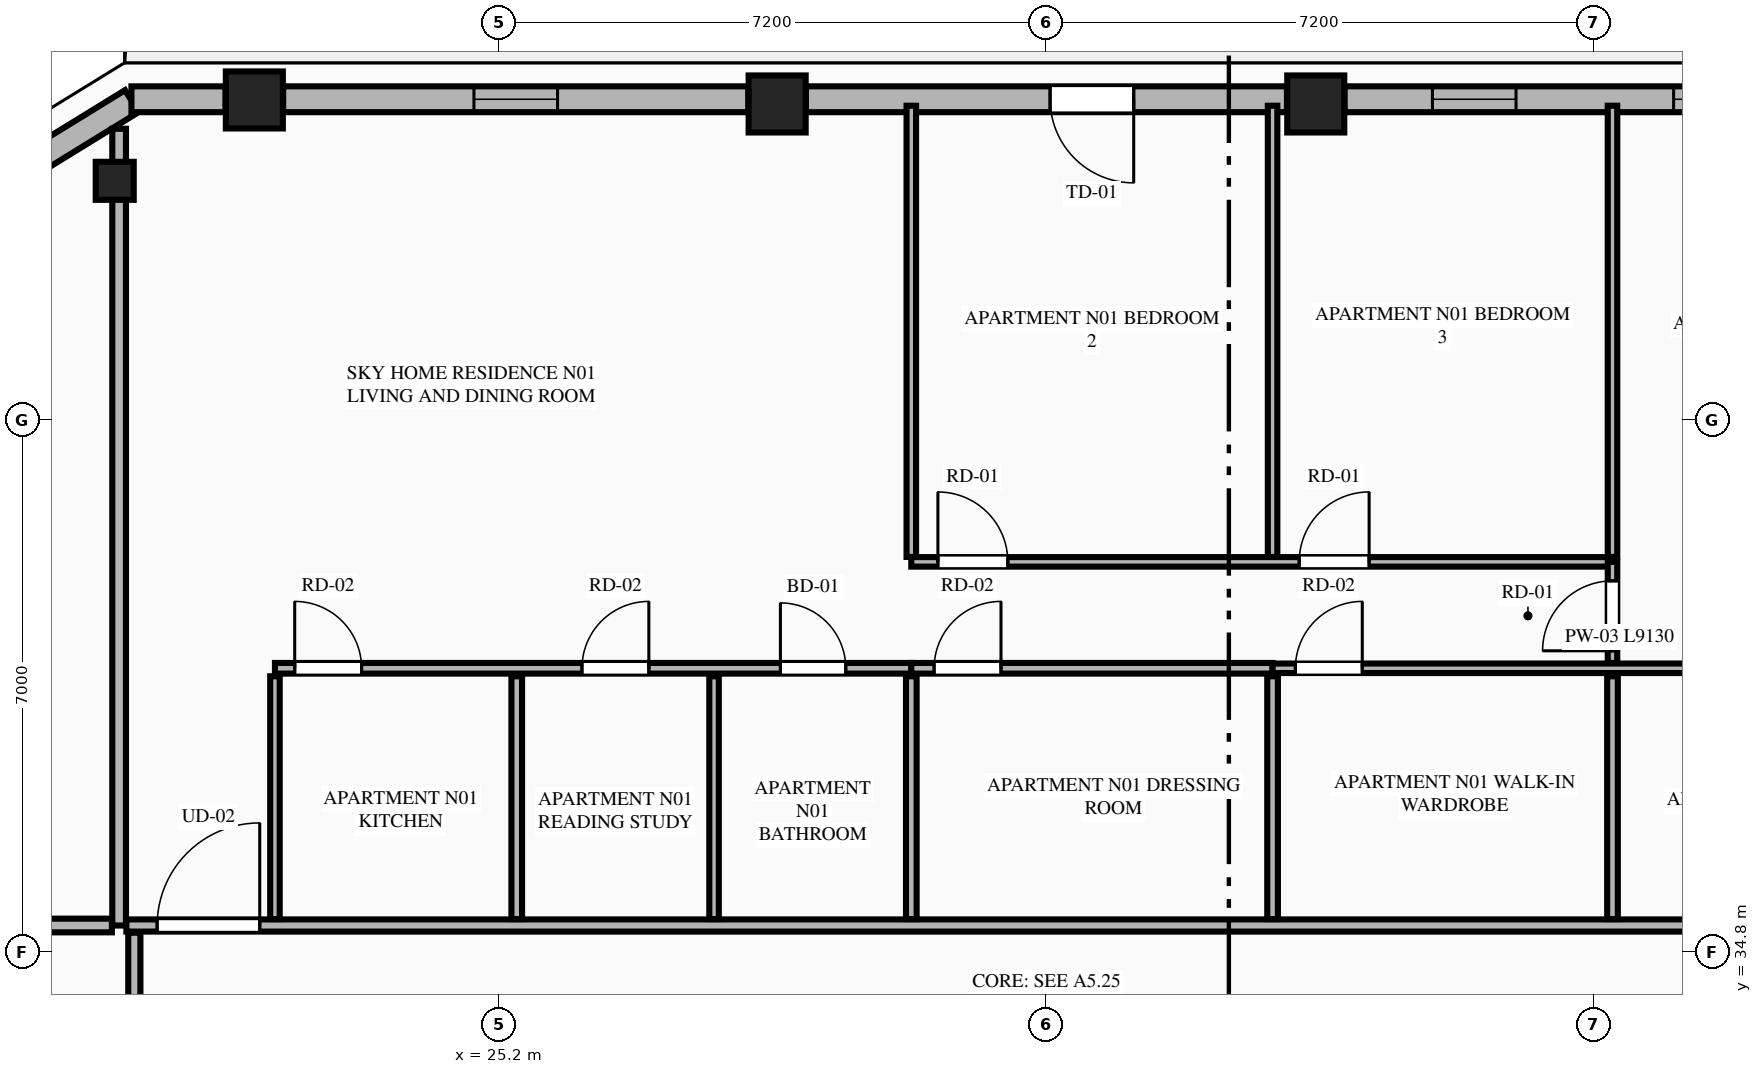
"""IFC4 building model, lengths in metres.
Left out: names, types, materials, properties, quantities, classifications, styles, units other than length and angle.
Written with IfcOpenShell. Run it as: python <this file> out.ifc"""

import sys

from ifc_helpers import new_model, si_unit, direction, frame, frame_2d, origin, origin_2d, place, context, subcontext, project, spatial, rectangle, extrude, element, fill, save


model = new_model("IFC4")
c1 = context("Model", 3, precision=1e-05, world=origin(), true_north=direction((0.0, 1.0)))
c2 = subcontext(c1, "Body", "Model", "MODEL_VIEW")
j1 = project(units=[si_unit("LENGTHUNIT", "METRE"), si_unit("PLANEANGLEUNIT", "RADIAN")], contexts=[c1])
p1 = place(None, origin())
s1 = spatial("IfcSite", under=j1, at=p1, CompositionType="ELEMENT")
p2 = place(p1, origin())
s2 = spatial("IfcBuilding", under=s1, at=p2, CompositionType="ELEMENT")
p3 = place(p2, frame((0.0, 0.0, 218.05)))
s3 = spatial("IfcBuildingStorey", under=s2, at=p3, CompositionType="ELEMENT", Elevation=218.05)
for number, where, z_axis, x_axis in (
    (1, (35.943, 45.958, 0.0), (0.0, 0.0, 1.0), (1.0, 0.0, 0.0)),
    (2, (28.857, 45.958, 0.0), (0.0, 0.0, 1.0), (1.0, 0.0, 0.0)),
    (3, (21.979, 46.011, 0.0), (0.0, 0.0, 1.0), (1.0, 0.0, 0.0)),
):
    element("IfcColumn", number, at=place(p3, frame(where, z_axis=z_axis, x_axis=x_axis)), inside=s3, PredefinedType="COLUMN", context=c2, shape_type="SweptSolid", body=[
        extrude(rectangle(XDim=0.75, YDim=0.75, at=origin_2d()), origin(), (0.0, 0.0, 1.0), 3.55),
    ])
p4 = place(p3, frame((20.142, 44.947, 0.0), z_axis=(0.0, 0.0, 1.0), x_axis=(-0.865230187018, -0.501374833306, 0.0)))
e4 = element("IfcColumn", 4, at=p4, inside=s3, PredefinedType="PILASTER", context=c2, shape_type="SweptSolid", body=[
    extrude(rectangle(XDim=0.5, YDim=0.35, at=origin_2d()), origin(), (0.0, 0.0, 1.0), 3.55),
])
p5 = place(p3, frame((20.367, 45.995, 0.0), z_axis=(0.0, 0.0, 1.0), x_axis=(-0.851713271379, -0.524008113828, 0.0)))
e5 = element("IfcWall", 5, at=p5, inside=s3, PredefinedType="STANDARD", context=c2, shape_type="SweptSolid", body=[
    extrude(rectangle(XDim=1.678, YDim=0.34, at=frame_2d((0.839, 0.0))), origin(), (0.0, 0.0, 1.0), 3.27),
])
p6 = place(p3, frame((42.442, 46.02, 0.0), z_axis=(0.0, 0.0, 1.0), x_axis=(-1.0, 0.0, 0.0)))
e6 = element("IfcWall", 6, at=p6, inside=s3, PredefinedType="STANDARD", context=c2, shape_type="SweptSolid", body=[
    extrude(rectangle(XDim=6.12, YDim=0.34, at=frame_2d((3.06, 0.0))), origin(), (0.0, 0.0, 1.0), 2.803),
])
p7 = place(p6, frame((0.691, 0.0, 0.75)))
e7 = element("IfcOpeningElement", 7, at=p7, cuts=e6, PredefinedType="OPENING", context=c2, shape_type="SweptSolid", body=[
    extrude(rectangle(XDim=1.1, YDim=1.903, at=frame_2d((0.55, 0.952))), frame((0.0, 0.18, 0.0), z_axis=(0.0, -1.0, 0.0), x_axis=(1.0, 0.0, 0.0)), (0.0, 0.0, 1.0), 0.36),
])
p8 = place(p6, frame((3.864, 0.0, 0.75)))
e8 = element("IfcOpeningElement", 8, at=p8, cuts=e6, PredefinedType="OPENING", context=c2, shape_type="SweptSolid", body=[
    extrude(rectangle(XDim=1.1, YDim=1.903, at=frame_2d((0.55, 0.952))), frame((0.0, 0.18, 0.0), z_axis=(0.0, -1.0, 0.0), x_axis=(1.0, 0.0, 0.0)), (0.0, 0.0, 1.0), 0.36),
])
p9 = place(p3, frame((35.564, 46.02, 0.0), z_axis=(0.0, 0.0, 1.0), x_axis=(-1.0, 0.0, 0.0)))
e9 = element("IfcWall", 9, at=p9, inside=s3, PredefinedType="STANDARD", context=c2, shape_type="SweptSolid", body=[
    extrude(rectangle(XDim=6.328, YDim=0.34, at=frame_2d((3.164, 0.0))), origin(), (0.0, 0.0, 1.0), 2.803),
])
p10 = place(p9, frame((2.016, 0.0, 0.0)))
e10 = element("IfcOpeningElement", 10, at=p10, cuts=e9, PredefinedType="OPENING", context=c2, shape_type="SweptSolid", body=[
    extrude(rectangle(XDim=1.1, YDim=2.25, at=frame_2d((0.55, 1.125))), frame((0.0, 0.18, 0.0), z_axis=(0.0, -1.0, 0.0), x_axis=(1.0, 0.0, 0.0)), (0.0, 0.0, 1.0), 0.36),
])
p11 = place(p3, frame((28.478, 46.02, 0.0), z_axis=(0.0, 0.0, 1.0), x_axis=(-1.0, 0.0, 0.0)))
e11 = element("IfcWall", 11, at=p11, inside=s3, PredefinedType="STANDARD", context=c2, shape_type="SweptSolid", body=[
    extrude(rectangle(XDim=6.12, YDim=0.34, at=frame_2d((3.06, 0.0))), origin(), (0.0, 0.0, 1.0), 2.803),
])
p12 = place(p11, frame((2.51, 0.0, 0.75)))
e12 = element("IfcOpeningElement", 12, at=p12, cuts=e11, PredefinedType="OPENING", context=c2, shape_type="SweptSolid", body=[
    extrude(rectangle(XDim=1.1, YDim=1.903, at=frame_2d((0.55, 0.952))), frame((0.0, 0.18, 0.0), z_axis=(0.0, -1.0, 0.0), x_axis=(1.0, 0.0, 0.0)), (0.0, 0.0, 1.0), 0.36),
])
p13 = place(p3, frame((21.6, 46.02, 0.0), z_axis=(0.0, 0.0, 1.0), x_axis=(-1.0, 0.0, 0.0)))
e13 = element("IfcWall", 13, at=p13, inside=s3, PredefinedType="STANDARD", context=c2, shape_type="SweptSolid", body=[
    extrude(rectangle(XDim=1.238, YDim=0.34, at=frame_2d((0.619, 0.0))), origin(), (0.0, 0.0, 1.0), 3.27),
])
p14 = place(p3, frame((20.2, 35.15, 0.0), z_axis=(0.0, 0.0, 1.0), x_axis=(0.0, 1.0, 0.0)))
e14 = element("IfcWall", 14, at=p14, inside=s3, PredefinedType="PARTITIONING", context=c2, shape_type="SweptSolid", body=[
    extrude(rectangle(XDim=10.482, YDim=0.18, at=frame_2d((5.241, 0.0))), origin(), (0.0, 0.0, 1.0), 3.27),
])
p15 = place(p3, frame((20.295, 35.15, 0.0), z_axis=(0.0, 0.0, 1.0), x_axis=(1.0, 0.0, 0.0)))
e15 = element("IfcWall", 15, at=p15, inside=s3, PredefinedType="PARTITIONING", context=c2, shape_type="SweptSolid", body=[
    extrude(rectangle(XDim=24.21, YDim=0.16, at=frame_2d((12.105, 0.0))), origin(), (0.0, 0.0, 1.0), 3.27),
])
p16 = place(p15, frame((0.405, 0.0, 0.0)))
e16 = element("IfcOpeningElement", 16, at=p16, cuts=e15, PredefinedType="OPENING", context=c2, shape_type="SweptSolid", body=[
    extrude(rectangle(XDim=1.35, YDim=2.35, at=frame_2d((0.675, 1.175))), frame((0.0, 0.09, 0.0), z_axis=(0.0, -1.0, 0.0), x_axis=(1.0, 0.0, 0.0)), (0.0, 0.0, 1.0), 0.18),
])
p17 = place(p3, frame((22.25, 35.235, 0.0), z_axis=(0.0, 0.0, 1.0), x_axis=(0.0, 1.0, 0.0)))
e17 = element("IfcWall", 17, at=p17, inside=s3, PredefinedType="PARTITIONING", context=c2, shape_type="SweptSolid", body=[
    extrude(rectangle(XDim=3.194, YDim=0.125, at=frame_2d((1.597, 0.0))), origin(), (0.0, 0.0, 1.0), 2.727),
])
p18 = place(p3, frame((22.25, 38.534, 0.0), z_axis=(0.0, 0.0, 1.0), x_axis=(1.0, 0.0, 0.0)))
e18 = element("IfcWall", 18, at=p18, inside=s3, PredefinedType="PLUMBINGWALL", context=c2, shape_type="SweptSolid", body=[
    extrude(rectangle(XDim=8.372, YDim=0.14, at=frame_2d((4.186, 0.0))), origin(), (0.0, 0.0, 1.0), 3.27),
])
p19 = place(p18, frame((6.65, 0.0, 0.0)))
e19 = element("IfcOpeningElement", 19, at=p19, cuts=e18, PredefinedType="OPENING", context=c2, shape_type="SweptSolid", body=[
    extrude(rectangle(XDim=0.86, YDim=2.1, at=frame_2d((0.43, 1.05))), frame((0.0, 0.08, 0.0), z_axis=(0.0, -1.0, 0.0), x_axis=(1.0, 0.0, 0.0)), (0.0, 0.0, 1.0), 0.16),
])
p20 = place(p18, frame((0.26, 0.0, 0.0)))
e20 = element("IfcOpeningElement", 20, at=p20, cuts=e18, PredefinedType="OPENING", context=c2, shape_type="SweptSolid", body=[
    extrude(rectangle(XDim=0.88, YDim=2.15, at=frame_2d((0.44, 1.075))), frame((0.0, 0.08, 0.0), z_axis=(0.0, -1.0, 0.0), x_axis=(1.0, 0.0, 0.0)), (0.0, 0.0, 1.0), 0.16),
])
p21 = place(p18, frame((4.039, 0.0, 0.0)))
e21 = element("IfcOpeningElement", 21, at=p21, cuts=e18, PredefinedType="OPENING", context=c2, shape_type="SweptSolid", body=[
    extrude(rectangle(XDim=0.88, YDim=2.15, at=frame_2d((0.44, 1.075))), frame((0.0, 0.08, 0.0), z_axis=(0.0, -1.0, 0.0), x_axis=(1.0, 0.0, 0.0)), (0.0, 0.0, 1.0), 0.16),
])
p22 = place(p3, frame((30.622, 38.534, 0.0), z_axis=(0.0, 0.0, 1.0), x_axis=(1.0, 0.0, 0.0)))
e22 = element("IfcWall", 22, at=p22, inside=s3, PredefinedType="PLUMBINGWALL", context=c2, shape_type="SweptSolid", body=[
    extrude(rectangle(XDim=4.753, YDim=0.14, at=frame_2d((2.376, 0.0))), origin(), (0.0, 0.0, 1.0), 3.27),
])
p23 = place(p22, frame((0.3, 0.0, 0.0)))
e23 = element("IfcOpeningElement", 23, at=p23, cuts=e22, PredefinedType="OPENING", context=c2, shape_type="SweptSolid", body=[
    extrude(rectangle(XDim=0.88, YDim=2.15, at=frame_2d((0.44, 1.075))), frame((0.0, 0.08, 0.0), z_axis=(0.0, -1.0, 0.0), x_axis=(1.0, 0.0, 0.0)), (0.0, 0.0, 1.0), 0.16),
])
p24 = place(p3, frame((35.375, 38.534, 0.0), z_axis=(0.0, 0.0, 1.0), x_axis=(1.0, 0.0, 0.0)))
e24 = element("IfcWall", 24, at=p24, inside=s3, PredefinedType="PARTITIONING", context=c2, shape_type="SweptSolid", body=[
    extrude(rectangle(XDim=9.13, YDim=0.125, at=frame_2d((4.565, 0.0))), origin(), (0.0, 0.0, 1.0), 3.27),
])
p25 = place(p24, frame((6.376, 0.0, 0.0)))
e25 = element("IfcOpeningElement", 25, at=p25, cuts=e24, PredefinedType="OPENING", context=c2, shape_type="SweptSolid", body=[
    extrude(rectangle(XDim=0.86, YDim=2.1, at=frame_2d((0.43, 1.05))), frame((0.0, 0.073, 0.0), z_axis=(0.0, -1.0, 0.0), x_axis=(1.0, 0.0, 0.0)), (0.0, 0.0, 1.0), 0.145),
])
p26 = place(p24, frame((0.3, 0.0, 0.0)))
e26 = element("IfcOpeningElement", 26, at=p26, cuts=e24, PredefinedType="OPENING", context=c2, shape_type="SweptSolid", body=[
    extrude(rectangle(XDim=0.88, YDim=2.15, at=frame_2d((0.44, 1.075))), frame((0.0, 0.073, 0.0), z_axis=(0.0, -1.0, 0.0), x_axis=(1.0, 0.0, 0.0)), (0.0, 0.0, 1.0), 0.145),
])
p27 = place(p3, frame((25.431, 35.235, 0.0), z_axis=(0.0, 0.0, 1.0), x_axis=(0.0, 1.0, 0.0)))
e27 = element("IfcWall", 27, at=p27, inside=s3, PredefinedType="PLUMBINGWALL", context=c2, shape_type="SweptSolid", body=[
    extrude(rectangle(XDim=3.194, YDim=0.14, at=frame_2d((1.597, 0.0))), origin(), (0.0, 0.0, 1.0), 3.27),
])
p28 = place(p3, frame((28.027, 35.235, 0.0), z_axis=(0.0, 0.0, 1.0), x_axis=(0.0, 1.0, 0.0)))
e28 = element("IfcWall", 28, at=p28, inside=s3, PredefinedType="PARTITIONING", context=c2, shape_type="SweptSolid", body=[
    extrude(rectangle(XDim=3.194, YDim=0.125, at=frame_2d((1.597, 0.0))), origin(), (0.0, 0.0, 1.0), 3.27),
])
p29 = place(p3, frame((30.622, 39.999, 0.0), z_axis=(0.0, 0.0, 1.0), x_axis=(0.0, 1.0, 0.0)))
e29 = element("IfcWall", 29, at=p29, inside=s3, PredefinedType="PARTITIONING", context=c2, shape_type="SweptSolid", body=[
    extrude(rectangle(XDim=5.936, YDim=0.125, at=frame_2d((2.968, 0.0))), origin(), (0.0, 0.0, 1.0), 3.27),
])
p30 = place(p3, frame((30.622, 39.934, 0.0), z_axis=(0.0, 0.0, 1.0), x_axis=(1.0, 0.0, 0.0)))
e30 = element("IfcWall", 30, at=p30, inside=s3, PredefinedType="PARTITIONING", context=c2, shape_type="SweptSolid", body=[
    extrude(rectangle(XDim=9.225, YDim=0.125, at=frame_2d((4.612, 0.0))), origin(), (0.0, 0.0, 1.0), 3.27),
])
p31 = place(p30, frame((0.35, 0.0, 0.0)))
e31 = element("IfcOpeningElement", 31, at=p31, cuts=e30, PredefinedType="OPENING", context=c2, shape_type="SweptSolid", body=[
    extrude(rectangle(XDim=0.92, YDim=2.15, at=frame_2d((0.46, 1.075))), frame((0.0, 0.073, 0.0), z_axis=(0.0, -1.0, 0.0), x_axis=(1.0, 0.0, 0.0)), (0.0, 0.0, 1.0), 0.145),
])
p32 = place(p30, frame((5.103, 0.0, 0.0)))
e32 = element("IfcOpeningElement", 32, at=p32, cuts=e30, PredefinedType="OPENING", context=c2, shape_type="SweptSolid", body=[
    extrude(rectangle(XDim=0.92, YDim=2.15, at=frame_2d((0.46, 1.075))), frame((0.0, 0.073, 0.0), z_axis=(0.0, -1.0, 0.0), x_axis=(1.0, 0.0, 0.0)), (0.0, 0.0, 1.0), 0.145),
])
p33 = place(p3, frame((39.847, 38.604, 0.0), z_axis=(0.0, 0.0, 1.0), x_axis=(0.0, 1.0, 0.0)))
e33 = element("IfcWall", 33, at=p33, inside=s3, PredefinedType="PARTITIONING", context=c2, shape_type="SweptSolid", body=[
    extrude(rectangle(XDim=1.33, YDim=0.125, at=frame_2d((0.665, 0.0))), origin(), (0.0, 0.0, 1.0), 3.27),
])
p34 = place(p33, frame((0.16, 0.0, 0.0)))
e34 = element("IfcOpeningElement", 34, at=p34, cuts=e33, PredefinedType="OPENING", context=c2, shape_type="SweptSolid", body=[
    extrude(rectangle(XDim=0.92, YDim=2.15, at=frame_2d((0.46, 1.075))), frame((0.0, 0.073, 0.0), z_axis=(0.0, -1.0, 0.0), x_axis=(1.0, 0.0, 0.0)), (0.0, 0.0, 1.0), 0.145),
])
for number, where, z_axis, x_axis in (
    (35, (30.622, 35.235, 0.0), (0.0, 0.0, 1.0), (0.0, 1.0, 0.0)),
    (36, (35.375, 35.235, 0.0), (0.0, 0.0, 1.0), (0.0, 1.0, 0.0)),
):
    element("IfcWall", number, at=place(p3, frame(where, z_axis=z_axis, x_axis=x_axis)), inside=s3, PredefinedType="PLUMBINGWALL", context=c2, shape_type="SweptSolid", body=[
        extrude(rectangle(XDim=3.194, YDim=0.14, at=frame_2d((1.597, 0.0))), origin(), (0.0, 0.0, 1.0), 3.27),
    ])
for number, where, z_axis, x_axis in (
    (37, (35.375, 39.999, 0.0), (0.0, 0.0, 1.0), (0.0, 1.0, 0.0)),
    (38, (39.847, 39.999, 0.0), (0.0, 0.0, 1.0), (0.0, 1.0, 0.0)),
):
    element("IfcWall", number, at=place(p3, frame(where, z_axis=z_axis, x_axis=x_axis)), inside=s3, PredefinedType="PARTITIONING", context=c2, shape_type="SweptSolid", body=[
        extrude(rectangle(XDim=5.936, YDim=0.125, at=frame_2d((2.968, 0.0))), origin(), (0.0, 0.0, 1.0), 3.27),
    ])
p35 = place(p3, frame((39.847, 35.235, 0.0), z_axis=(0.0, 0.0, 1.0), x_axis=(0.0, 1.0, 0.0)))
e39 = element("IfcWall", 39, at=p35, inside=s3, PredefinedType="PLUMBINGWALL", context=c2, shape_type="SweptSolid", body=[
    extrude(rectangle(XDim=3.194, YDim=0.14, at=frame_2d((1.597, 0.0))), origin(), (0.0, 0.0, 1.0), 3.27),
])
p36 = place(p3, frame((14.11, 35.15, 0.0), z_axis=(0.0, 0.0, 1.0), x_axis=(1.0, 0.0, 0.0)))
e40 = element("IfcWall", 40, at=p36, inside=s3, PredefinedType="PARTITIONING", context=c2, shape_type="SweptSolid", body=[
    extrude(rectangle(XDim=5.995, YDim=0.18, at=frame_2d((2.998, 0.0))), origin(), (0.0, 0.0, 1.0), 3.27),
])
p37 = place(p3, frame((20.4, 25.417, 0.0), z_axis=(0.0, 0.0, 1.0), x_axis=(0.0, 1.0, 0.0)))
e41 = element("IfcWall", 41, at=p37, inside=s3, PredefinedType="PARTITIONING", context=c2, shape_type="SweptSolid", body=[
    extrude(rectangle(XDim=9.638, YDim=0.16, at=frame_2d((4.819, 0.0))), origin(), (0.0, 0.0, 1.0), 3.27),
])
p38 = place(p37, frame((0.4, 0.0, 0.0)))
e42 = element("IfcOpeningElement", 42, at=p38, cuts=e41, PredefinedType="OPENING", context=c2, shape_type="SweptSolid", body=[
    extrude(rectangle(XDim=1.02, YDim=2.25, at=frame_2d((0.51, 1.125))), frame((0.0, 0.09, 0.0), z_axis=(0.0, -1.0, 0.0), x_axis=(1.0, 0.0, 0.0)), (0.0, 0.0, 1.0), 0.18),
])
p39 = place(p7, origin())
e43 = element("IfcWindow", 43, at=p39, inside=s3, PartitioningType="SINGLE_PANEL", PredefinedType="WINDOW", context=c2, shape_type="SweptSolid", body=[
    extrude(rectangle(XDim=1.1, YDim=1.903, at=frame_2d((0.55, 0.952))), frame((0.0, 0.03, 0.0), z_axis=(0.0, -1.0, 0.0), x_axis=(1.0, 0.0, 0.0)), (0.0, 0.0, 1.0), 0.06),
])
fill(e7, e43)
p40 = place(p10, origin())
e44 = element("IfcDoor", 44, at=p40, inside=s3, OperationType="SINGLE_SWING_LEFT", PredefinedType="DOOR", context=c2, shape_type="SweptSolid", body=[
    extrude(rectangle(XDim=1.1, YDim=2.25, at=frame_2d((0.55, 1.125))), frame((0.0, 0.025, 0.0), z_axis=(0.0, -1.0, 0.0), x_axis=(1.0, 0.0, 0.0)), (0.0, 0.0, 1.0), 0.05),
])
fill(e10, e44)
p41 = place(p12, origin())
e45 = element("IfcWindow", 45, at=p41, inside=s3, PartitioningType="SINGLE_PANEL", PredefinedType="WINDOW", context=c2, shape_type="SweptSolid", body=[
    extrude(rectangle(XDim=1.1, YDim=1.903, at=frame_2d((0.55, 0.952))), frame((0.0, 0.03, 0.0), z_axis=(0.0, -1.0, 0.0), x_axis=(1.0, 0.0, 0.0)), (0.0, 0.0, 1.0), 0.06),
])
fill(e12, e45)
p42 = place(p19, origin())
e46 = element("IfcDoor", 46, at=p42, inside=s3, OperationType="SINGLE_SWING_LEFT", PredefinedType="DOOR", context=c2, shape_type="SweptSolid", body=[
    extrude(rectangle(XDim=0.86, YDim=2.1, at=frame_2d((0.43, 1.05))), frame((0.0, 0.025, 0.0), z_axis=(0.0, -1.0, 0.0), x_axis=(1.0, 0.0, 0.0)), (0.0, 0.0, 1.0), 0.05),
])
fill(e19, e46)
p43 = place(p16, origin())
e47 = element("IfcDoor", 47, at=p43, inside=s3, OperationType="SINGLE_SWING_RIGHT", PredefinedType="DOOR", context=c2, shape_type="SweptSolid", body=[
    extrude(rectangle(XDim=1.35, YDim=2.35, at=frame_2d((0.675, 1.175))), frame((0.0, 0.025, 0.0), z_axis=(0.0, -1.0, 0.0), x_axis=(1.0, 0.0, 0.0)), (0.0, 0.0, 1.0), 0.05),
])
fill(e16, e47)
p44 = place(p20, origin())
e48 = element("IfcDoor", 48, at=p44, inside=s3, OperationType="SINGLE_SWING_LEFT", PredefinedType="DOOR", context=c2, shape_type="SweptSolid", body=[
    extrude(rectangle(XDim=0.88, YDim=2.15, at=frame_2d((0.44, 1.075))), frame((0.0, 0.025, 0.0), z_axis=(0.0, -1.0, 0.0), x_axis=(1.0, 0.0, 0.0)), (0.0, 0.0, 1.0), 0.05),
])
fill(e20, e48)
p45 = place(p21, origin())
e49 = element("IfcDoor", 49, at=p45, inside=s3, OperationType="SINGLE_SWING_RIGHT", PredefinedType="DOOR", context=c2, shape_type="SweptSolid", body=[
    extrude(rectangle(XDim=0.88, YDim=2.15, at=frame_2d((0.44, 1.075))), frame((0.0, 0.025, 0.0), z_axis=(0.0, -1.0, 0.0), x_axis=(1.0, 0.0, 0.0)), (0.0, 0.0, 1.0), 0.05),
])
fill(e21, e49)
p46 = place(p23, origin())
e50 = element("IfcDoor", 50, at=p46, inside=s3, OperationType="SINGLE_SWING_RIGHT", PredefinedType="DOOR", context=c2, shape_type="SweptSolid", body=[
    extrude(rectangle(XDim=0.88, YDim=2.15, at=frame_2d((0.44, 1.075))), frame((0.0, 0.025, 0.0), z_axis=(0.0, -1.0, 0.0), x_axis=(1.0, 0.0, 0.0)), (0.0, 0.0, 1.0), 0.05),
])
fill(e23, e50)
p47 = place(p31, origin())
e51 = element("IfcDoor", 51, at=p47, inside=s3, OperationType="SINGLE_SWING_LEFT", PredefinedType="DOOR", context=c2, shape_type="SweptSolid", body=[
    extrude(rectangle(XDim=0.92, YDim=2.15, at=frame_2d((0.46, 1.075))), frame((0.0, 0.025, 0.0), z_axis=(0.0, -1.0, 0.0), x_axis=(1.0, 0.0, 0.0)), (0.0, 0.0, 1.0), 0.05),
])
fill(e31, e51)
p48 = place(p32, origin())
e52 = element("IfcDoor", 52, at=p48, inside=s3, OperationType="SINGLE_SWING_RIGHT", PredefinedType="DOOR", context=c2, shape_type="SweptSolid", body=[
    extrude(rectangle(XDim=0.92, YDim=2.15, at=frame_2d((0.46, 1.075))), frame((0.0, 0.025, 0.0), z_axis=(0.0, -1.0, 0.0), x_axis=(1.0, 0.0, 0.0)), (0.0, 0.0, 1.0), 0.05),
])
fill(e32, e52)
p49 = place(p34, origin())
e53 = element("IfcDoor", 53, at=p49, inside=s3, OperationType="SINGLE_SWING_LEFT", PredefinedType="DOOR", context=c2, shape_type="SweptSolid", body=[
    extrude(rectangle(XDim=0.92, YDim=2.15, at=frame_2d((0.46, 1.075))), frame((0.0, 0.025, 0.0), z_axis=(0.0, -1.0, 0.0), x_axis=(1.0, 0.0, 0.0)), (0.0, 0.0, 1.0), 0.05),
])
fill(e34, e53)
p50 = place(p26, origin())
e54 = element("IfcDoor", 54, at=p50, inside=s3, OperationType="SINGLE_SWING_RIGHT", PredefinedType="DOOR", context=c2, shape_type="SweptSolid", body=[
    extrude(rectangle(XDim=0.88, YDim=2.15, at=frame_2d((0.44, 1.075))), frame((0.0, 0.025, 0.0), z_axis=(0.0, -1.0, 0.0), x_axis=(1.0, 0.0, 0.0)), (0.0, 0.0, 1.0), 0.05),
])
fill(e26, e54)
p51 = place(p8, origin())
e55 = element("IfcWindow", 55, at=p51, inside=s3, PartitioningType="SINGLE_PANEL", PredefinedType="WINDOW", context=c2, shape_type="SweptSolid", body=[
    extrude(rectangle(XDim=1.1, YDim=1.903, at=frame_2d((0.55, 0.952))), frame((0.0, 0.03, 0.0), z_axis=(0.0, -1.0, 0.0), x_axis=(1.0, 0.0, 0.0)), (0.0, 0.0, 1.0), 0.06),
])
fill(e8, e55)
save(model, sys.argv[1])
